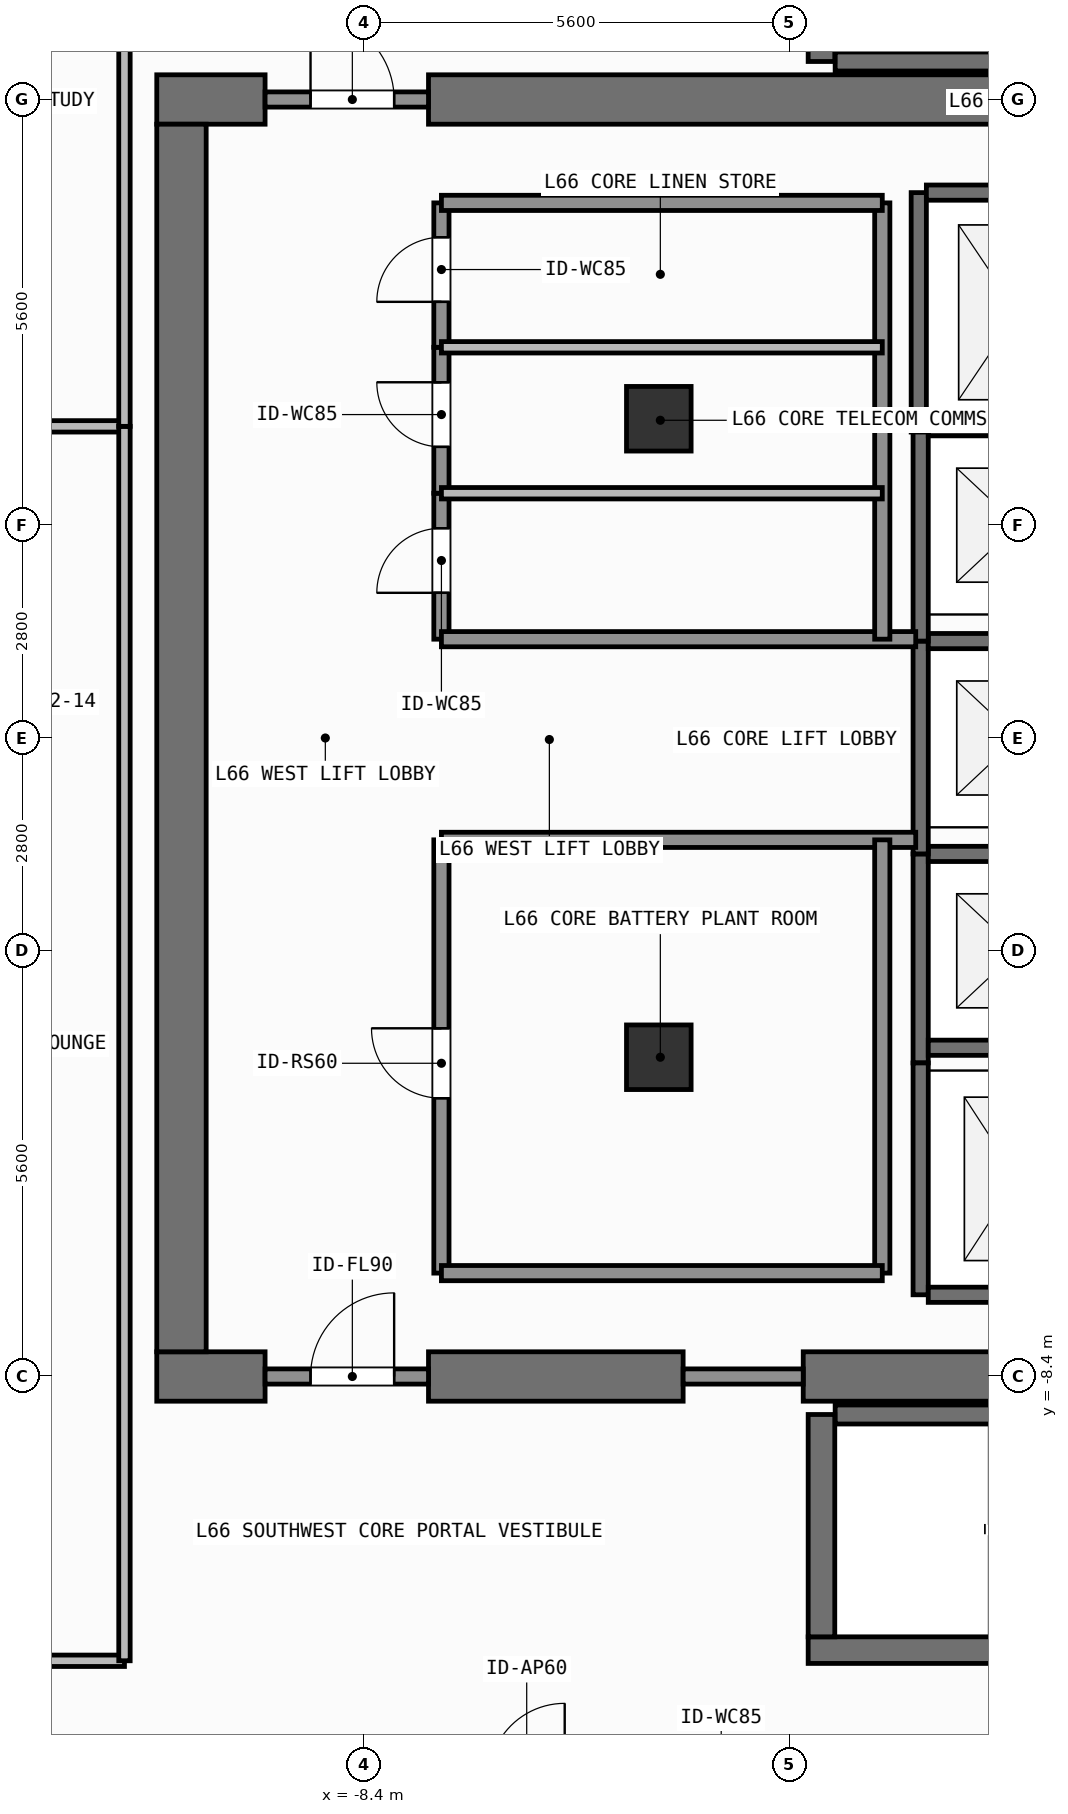
"""IFC4 building model, lengths in metres.
Left out: names, types, materials, properties, quantities, classifications, styles, units other than length and angle.
Written with IfcOpenShell. Run it as: python <this file> out.ifc"""

import sys

from ifc_helpers import new_model, si_unit, direction, frame, frame_2d, origin, origin_2d, place, context, subcontext, project, spatial, rectangle, extrude, element, fill, save


model = new_model("IFC4")
c1 = context("Model", 3, precision=1e-05, world=origin(), true_north=direction((0.0, 1.0)))
c2 = subcontext(c1, "Body", "Model", "MODEL_VIEW")
j1 = project(units=[si_unit("LENGTHUNIT", "METRE"), si_unit("PLANEANGLEUNIT", "RADIAN")], contexts=[c1])
p1 = place(None, origin())
s1 = spatial("IfcSite", under=j1, at=p1, CompositionType="ELEMENT")
p2 = place(p1, origin())
s2 = spatial("IfcBuilding", under=s1, at=p2, CompositionType="ELEMENT")
p3 = place(p2, frame((0.0, 0.0, 270.3)))
s3 = spatial("IfcBuildingStorey", under=s2, at=p3, CompositionType="ELEMENT", Elevation=270.3)
p4 = place(p3, frame((-11.125, -8.4, 0.0), z_axis=(0.0, 0.0, 1.0), x_axis=(1.0, 0.0, 0.0)))
e1 = element("IfcWall", 1, at=p4, inside=s3, PredefinedType="SHEAR", context=c2, shape_type="SweptSolid", body=[
    extrude(rectangle(XDim=1.425, YDim=0.65, at=frame_2d((0.712, 0.0))), origin(), (0.0, 0.0, 1.0), 3.9),
])
p5 = place(p3, frame((-7.55, -8.4, 0.0), z_axis=(0.0, 0.0, 1.0), x_axis=(1.0, 0.0, 0.0)))
e2 = element("IfcWall", 2, at=p5, inside=s3, PredefinedType="SHEAR", context=c2, shape_type="SweptSolid", body=[
    extrude(rectangle(XDim=3.35, YDim=0.65, at=frame_2d((1.675, 0.0))), origin(), (0.0, 0.0, 1.0), 3.9),
])
p6 = place(p3, frame((-2.62, -8.4, 0.0), z_axis=(0.0, 0.0, 1.0), x_axis=(1.0, 0.0, 0.0)))
e3 = element("IfcWall", 3, at=p6, inside=s3, PredefinedType="SHEAR", context=c2, shape_type="SweptSolid", body=[
    extrude(rectangle(XDim=7.27, YDim=0.65, at=frame_2d((3.635, 0.0))), origin(), (0.0, 0.0, 1.0), 3.9),
])
p7 = place(p3, frame((-11.125, 8.4, 0.0), z_axis=(0.0, 0.0, 1.0), x_axis=(1.0, 0.0, 0.0)))
e4 = element("IfcWall", 4, at=p7, inside=s3, PredefinedType="SHEAR", context=c2, shape_type="SweptSolid", body=[
    extrude(rectangle(XDim=1.425, YDim=0.65, at=frame_2d((0.712, 0.0))), origin(), (0.0, 0.0, 1.0), 3.9),
])
p8 = place(p3, frame((-7.55, 8.4, 0.0), z_axis=(0.0, 0.0, 1.0), x_axis=(1.0, 0.0, 0.0)))
e5 = element("IfcWall", 5, at=p8, inside=s3, PredefinedType="SHEAR", context=c2, shape_type="SweptSolid", body=[
    extrude(rectangle(XDim=16.275, YDim=0.65, at=frame_2d((8.138, 0.0))), origin(), (0.0, 0.0, 1.0), 3.9),
])
p9 = place(p3, frame((-10.8, -8.075, 0.0), z_axis=(0.0, 0.0, 1.0), x_axis=(0.0, 1.0, 0.0)))
e6 = element("IfcWall", 6, at=p9, inside=s3, PredefinedType="SHEAR", context=c2, shape_type="SweptSolid", body=[
    extrude(rectangle(XDim=16.15, YDim=0.65, at=frame_2d((8.075, 0.0))), origin(), (0.0, 0.0, 1.0), 3.9),
])
p10 = place(p3, frame((-2.555, -12.0, 0.0), z_axis=(0.0, 0.0, 1.0), x_axis=(1.0, 0.0, 0.0)))
e7 = element("IfcWall", 7, at=p10, inside=s3, PredefinedType="SHEAR", context=c2, shape_type="SweptSolid", body=[
    extrude(rectangle(XDim=7.31, YDim=0.35, at=frame_2d((3.655, 0.0))), origin(), (0.0, 0.0, 1.0), 3.9),
])
p11 = place(p3, frame((-2.2, -8.9, 0.0), z_axis=(0.0, 0.0, 1.0), x_axis=(1.0, 0.0, 0.0)))
e8 = element("IfcWall", 8, at=p11, inside=s3, PredefinedType="SHEAR", context=c2, shape_type="SweptSolid", body=[
    extrude(rectangle(XDim=6.6, YDim=0.25, at=frame_2d((3.3, 0.0))), origin(), (0.0, 0.0, 1.0), 3.9),
])
p12 = place(p3, frame((-2.38, -11.825, 0.0), z_axis=(0.0, 0.0, 1.0), x_axis=(0.0, 1.0, 0.0)))
e9 = element("IfcWall", 9, at=p12, inside=s3, PredefinedType="SHEAR", context=c2, shape_type="SweptSolid", body=[
    extrude(rectangle(XDim=2.925, YDim=0.35, at=frame_2d((1.462, 0.0))), origin(), (0.0, 0.0, 1.0), 3.9),
])
p13 = place(p3, frame((-2.2, 8.9, 0.0), z_axis=(0.0, 0.0, 1.0), x_axis=(1.0, 0.0, 0.0)))
e10 = element("IfcWall", 10, at=p13, inside=s3, PredefinedType="SHEAR", context=c2, shape_type="SweptSolid", body=[
    extrude(rectangle(XDim=6.6, YDim=0.25, at=frame_2d((3.3, 0.0))), origin(), (0.0, 0.0, 1.0), 3.9),
])
p14 = place(p3, frame((-2.38, 8.9, 0.0), z_axis=(0.0, 0.0, 1.0), x_axis=(0.0, 1.0, 0.0)))
e11 = element("IfcWall", 11, at=p14, inside=s3, PredefinedType="SHEAR", context=c2, shape_type="SweptSolid", body=[
    extrude(rectangle(XDim=2.925, YDim=0.35, at=frame_2d((1.462, 0.0))), origin(), (0.0, 0.0, 1.0), 3.9),
])
for number, where, z_axis, x_axis in (
    (12, (-4.52, -4.2, 0.0), (0.0, 0.0, 1.0), (1.0, 0.0, 0.0)),
    (13, (-4.52, 4.2, 0.0), (0.0, 0.0, 1.0), (1.0, 0.0, 0.0)),
):
    element("IfcColumn", number, at=place(p3, frame(where, z_axis=z_axis, x_axis=x_axis)), inside=s3, PredefinedType="COLUMN", context=c2, shape_type="SweptSolid", body=[
        extrude(rectangle(XDim=0.85, YDim=0.85, at=origin_2d()), origin(), (0.0, 0.0, 1.0), 3.9),
    ])
p15 = place(p3, frame((-1.075, -4.275, 0.0), z_axis=(0.0, 0.0, 1.0), x_axis=(0.0, 1.0, 0.0)))
e14 = element("IfcWall", 14, at=p15, inside=s3, PredefinedType="SHEAR", context=c2, shape_type="SweptSolid", body=[
    extrude(rectangle(XDim=2.75, YDim=0.2, at=frame_2d((1.375, 0.0))), origin(), (0.0, 0.0, 1.0), 3.68),
])
for number, where, z_axis, x_axis in (
    (15, (-0.975, -4.075, 0.0), (0.0, 0.0, 1.0), (1.0, 0.0, 0.0)),
    (16, (-0.975, -1.525, 0.0), (0.0, 0.0, 1.0), (1.0, 0.0, 0.0)),
):
    element("IfcWall", number, at=place(p3, frame(where, z_axis=z_axis, x_axis=x_axis)), inside=s3, PredefinedType="SHEAR", context=c2, shape_type="SweptSolid", body=[
        extrude(rectangle(XDim=2.35, YDim=0.2, at=frame_2d((1.175, 0.0))), origin(), (0.0, 0.0, 1.0), 3.68),
    ])
p16 = place(p3, frame((-1.075, -1.525, 0.0), z_axis=(0.0, 0.0, 1.0), x_axis=(0.0, 1.0, 0.0)))
e17 = element("IfcWall", 17, at=p16, inside=s3, PredefinedType="SHEAR", context=c2, shape_type="SweptSolid", body=[
    extrude(rectangle(XDim=2.8, YDim=0.2, at=frame_2d((1.4, 0.0))), origin(), (0.0, 0.0, 1.0), 3.68),
])
p17 = place(p3, frame((-0.975, 1.275, 0.0), z_axis=(0.0, 0.0, 1.0), x_axis=(1.0, 0.0, 0.0)))
e18 = element("IfcWall", 18, at=p17, inside=s3, PredefinedType="SHEAR", context=c2, shape_type="SweptSolid", body=[
    extrude(rectangle(XDim=2.35, YDim=0.2, at=frame_2d((1.175, 0.0))), origin(), (0.0, 0.0, 1.0), 3.68),
])
p18 = place(p3, frame((-1.075, 1.275, 0.0), z_axis=(0.0, 0.0, 1.0), x_axis=(0.0, 1.0, 0.0)))
e19 = element("IfcWall", 19, at=p18, inside=s3, PredefinedType="SHEAR", context=c2, shape_type="SweptSolid", body=[
    extrude(rectangle(XDim=2.8, YDim=0.2, at=frame_2d((1.4, 0.0))), origin(), (0.0, 0.0, 1.0), 3.68),
])
p19 = place(p3, frame((-0.975, 4.075, 0.0), z_axis=(0.0, 0.0, 1.0), x_axis=(1.0, 0.0, 0.0)))
e20 = element("IfcWall", 20, at=p19, inside=s3, PredefinedType="SHEAR", context=c2, shape_type="SweptSolid", body=[
    extrude(rectangle(XDim=2.35, YDim=0.2, at=frame_2d((1.175, 0.0))), origin(), (0.0, 0.0, 1.0), 3.68),
])
p20 = place(p3, frame((-1.1, 4.025, 0.0), z_axis=(0.0, 0.0, 1.0), x_axis=(0.0, 1.0, 0.0)))
e21 = element("IfcWall", 21, at=p20, inside=s3, PredefinedType="SHEAR", context=c2, shape_type="SweptSolid", body=[
    extrude(rectangle(XDim=3.15, YDim=0.2, at=frame_2d((1.575, 0.0))), origin(), (0.0, 0.0, 1.0), 3.68),
])
p21 = place(p3, frame((-1.0, 7.175, 0.0), z_axis=(0.0, 0.0, 1.0), x_axis=(1.0, 0.0, 0.0)))
e22 = element("IfcWall", 22, at=p21, inside=s3, PredefinedType="SHEAR", context=c2, shape_type="SweptSolid", body=[
    extrude(rectangle(XDim=2.4, YDim=0.2, at=frame_2d((1.2, 0.0))), origin(), (0.0, 0.0, 1.0), 3.68),
])
p22 = place(p3, frame((-1.075, -7.325, 0.0), z_axis=(0.0, 0.0, 1.0), x_axis=(0.0, 1.0, 0.0)))
e23 = element("IfcWall", 23, at=p22, inside=s3, PredefinedType="SHEAR", context=c2, shape_type="SweptSolid", body=[
    extrude(rectangle(XDim=3.05, YDim=0.2, at=frame_2d((1.525, 0.0))), origin(), (0.0, 0.0, 1.0), 3.68),
])
p23 = place(p3, frame((-0.975, -7.325, 0.0), z_axis=(0.0, 0.0, 1.0), x_axis=(1.0, 0.0, 0.0)))
e24 = element("IfcWall", 24, at=p23, inside=s3, PredefinedType="SHEAR", context=c2, shape_type="SweptSolid", body=[
    extrude(rectangle(XDim=2.35, YDim=0.2, at=frame_2d((1.175, 0.0))), origin(), (0.0, 0.0, 1.0), 3.68),
])
p24 = place(p3, frame((-9.7, -8.4, 0.0), z_axis=(0.0, 0.0, 1.0), x_axis=(1.0, 0.0, 0.0)))
e25 = element("IfcWall", 25, at=p24, inside=s3, PredefinedType="SOLIDWALL", context=c2, shape_type="SweptSolid", body=[
    extrude(rectangle(XDim=2.15, YDim=0.2, at=frame_2d((1.075, 0.0))), origin(), (0.0, 0.0, 1.0), 2.92),
])
p25 = place(p24, frame((0.598, 0.0, 0.0)))
e26 = element("IfcOpeningElement", 26, at=p25, cuts=e25, PredefinedType="OPENING", context=c2, shape_type="SweptSolid", body=[
    extrude(rectangle(XDim=1.1, YDim=2.15, at=frame_2d((0.55, 1.075))), frame((0.0, 0.11, 0.0), z_axis=(0.0, -1.0, 0.0), x_axis=(1.0, 0.0, 0.0)), (0.0, 0.0, 1.0), 0.22),
])
p26 = place(p3, frame((-9.7, 8.4, 0.0), z_axis=(0.0, 0.0, 1.0), x_axis=(1.0, 0.0, 0.0)))
e27 = element("IfcWall", 27, at=p26, inside=s3, PredefinedType="SOLIDWALL", context=c2, shape_type="SweptSolid", body=[
    extrude(rectangle(XDim=2.15, YDim=0.2, at=frame_2d((1.075, 0.0))), origin(), (0.0, 0.0, 1.0), 2.92),
])
p27 = place(p26, frame((0.598, 0.0, 0.0)))
e28 = element("IfcOpeningElement", 28, at=p27, cuts=e27, PredefinedType="OPENING", context=c2, shape_type="SweptSolid", body=[
    extrude(rectangle(XDim=1.1, YDim=2.15, at=frame_2d((0.55, 1.075))), frame((0.0, 0.11, 0.0), z_axis=(0.0, -1.0, 0.0), x_axis=(1.0, 0.0, 0.0)), (0.0, 0.0, 1.0), 0.22),
])
p28 = place(p3, frame((-7.38, -7.04, 0.0), z_axis=(0.0, 0.0, 1.0), x_axis=(0.0, 1.0, 0.0)))
e29 = element("IfcWall", 29, at=p28, inside=s3, PredefinedType="SOLIDWALL", context=c2, shape_type="SweptSolid", body=[
    extrude(rectangle(XDim=5.7, YDim=0.2, at=frame_2d((2.85, 0.0))), origin(), (0.0, 0.0, 1.0), 3.68),
])
p29 = place(p28, frame((2.301, 0.0, 0.0)))
e30 = element("IfcOpeningElement", 30, at=p29, cuts=e29, PredefinedType="OPENING", context=c2, shape_type="SweptSolid", body=[
    extrude(rectangle(XDim=0.92, YDim=2.1, at=frame_2d((0.46, 1.05))), frame((0.0, 0.11, 0.0), z_axis=(0.0, -1.0, 0.0), x_axis=(1.0, 0.0, 0.0)), (0.0, 0.0, 1.0), 0.22),
])
p30 = place(p3, frame((-7.38, 1.3, 0.0), z_axis=(0.0, 0.0, 1.0), x_axis=(0.0, 1.0, 0.0)))
e31 = element("IfcWall", 31, at=p30, inside=s3, PredefinedType="SOLIDWALL", context=c2, shape_type="SweptSolid", body=[
    extrude(rectangle(XDim=1.92, YDim=0.2, at=frame_2d((0.96, 0.0))), origin(), (0.0, 0.0, 1.0), 3.68),
])
p31 = place(p30, frame((0.61, 0.0, 0.0)))
e32 = element("IfcOpeningElement", 32, at=p31, cuts=e31, PredefinedType="OPENING", context=c2, shape_type="SweptSolid", body=[
    extrude(rectangle(XDim=0.85, YDim=2.1, at=frame_2d((0.425, 1.05))), frame((0.0, 0.11, 0.0), z_axis=(0.0, -1.0, 0.0), x_axis=(1.0, 0.0, 0.0)), (0.0, 0.0, 1.0), 0.22),
])
p32 = place(p3, frame((-7.38, 3.22, 0.0), z_axis=(0.0, 0.0, 1.0), x_axis=(0.0, 1.0, 0.0)))
e33 = element("IfcWall", 33, at=p32, inside=s3, PredefinedType="SOLIDWALL", context=c2, shape_type="SweptSolid", body=[
    extrude(rectangle(XDim=1.92, YDim=0.2, at=frame_2d((0.96, 0.0))), origin(), (0.0, 0.0, 1.0), 3.68),
])
p33 = place(p32, frame((0.61, 0.0, 0.0)))
e34 = element("IfcOpeningElement", 34, at=p33, cuts=e33, PredefinedType="OPENING", context=c2, shape_type="SweptSolid", body=[
    extrude(rectangle(XDim=0.85, YDim=2.1, at=frame_2d((0.425, 1.05))), frame((0.0, 0.11, 0.0), z_axis=(0.0, -1.0, 0.0), x_axis=(1.0, 0.0, 0.0)), (0.0, 0.0, 1.0), 0.22),
])
p34 = place(p3, frame((-7.38, 5.14, 0.0), z_axis=(0.0, 0.0, 1.0), x_axis=(0.0, 1.0, 0.0)))
e35 = element("IfcWall", 35, at=p34, inside=s3, PredefinedType="SOLIDWALL", context=c2, shape_type="SweptSolid", body=[
    extrude(rectangle(XDim=1.9, YDim=0.2, at=frame_2d((0.95, 0.0))), origin(), (0.0, 0.0, 1.0), 3.68),
])
p35 = place(p34, frame((0.598, 0.0, 0.0)))
e36 = element("IfcOpeningElement", 36, at=p35, cuts=e35, PredefinedType="OPENING", context=c2, shape_type="SweptSolid", body=[
    extrude(rectangle(XDim=0.85, YDim=2.1, at=frame_2d((0.425, 1.05))), frame((0.0, 0.11, 0.0), z_axis=(0.0, -1.0, 0.0), x_axis=(1.0, 0.0, 0.0)), (0.0, 0.0, 1.0), 0.22),
])
p36 = place(p3, frame((-16.93, -12.14, 0.0), z_axis=(0.0, 0.0, 1.0), x_axis=(1.0, 0.0, 0.0)))
e37 = element("IfcWall", 37, at=p36, inside=s3, PredefinedType="PARTITIONING", context=c2, shape_type="SweptSolid", body=[
    extrude(rectangle(XDim=5.38, YDim=0.15, at=frame_2d((2.69, 0.0))), origin(), (0.0, 0.0, 1.0), 3.68),
])
p37 = place(p36, frame((2.24, 0.0, 0.0)))
e38 = element("IfcOpeningElement", 38, at=p37, cuts=e37, PredefinedType="OPENING", context=c2, shape_type="SweptSolid", body=[
    extrude(rectangle(XDim=0.9, YDim=2.1, at=frame_2d((0.45, 1.05))), frame((0.0, 0.085, 0.0), z_axis=(0.0, -1.0, 0.0), x_axis=(1.0, 0.0, 0.0)), (0.0, 0.0, 1.0), 0.17),
])
p38 = place(p3, frame((-4.2, -8.4, 0.0), z_axis=(0.0, 0.0, 1.0), x_axis=(1.0, 0.0, 0.0)))
e39 = element("IfcWall", 39, at=p38, inside=s3, PredefinedType="SOLIDWALL", context=c2, shape_type="SweptSolid", body=[
    extrude(rectangle(XDim=1.58, YDim=0.2, at=frame_2d((0.79, 0.0))), origin(), (0.0, 0.0, 1.0), 2.92),
])
for number, where, z_axis, x_axis in (
    (40, (-7.38, -1.34, 0.0), (0.0, 0.0, 1.0), (1.0, 0.0, 0.0)),
    (41, (-7.38, 1.3, 0.0), (0.0, 0.0, 1.0), (1.0, 0.0, 0.0)),
):
    element("IfcWall", number, at=place(p3, frame(where, z_axis=z_axis, x_axis=x_axis)), inside=s3, PredefinedType="SOLIDWALL", context=c2, shape_type="SweptSolid", body=[
        extrude(rectangle(XDim=6.24, YDim=0.2, at=frame_2d((3.12, 0.0))), origin(), (0.0, 0.0, 1.0), 3.68),
    ])
p39 = place(p3, frame((-1.58, -7.04, 0.0), z_axis=(0.0, 0.0, 1.0), x_axis=(0.0, 1.0, 0.0)))
e42 = element("IfcWall", 42, at=p39, inside=s3, PredefinedType="SOLIDWALL", context=c2, shape_type="SweptSolid", body=[
    extrude(rectangle(XDim=5.7, YDim=0.2, at=frame_2d((2.85, 0.0))), origin(), (0.0, 0.0, 1.0), 3.68),
])
p40 = place(p3, frame((-7.38, -7.04, 0.0), z_axis=(0.0, 0.0, 1.0), x_axis=(1.0, 0.0, 0.0)))
e43 = element("IfcWall", 43, at=p40, inside=s3, PredefinedType="SOLIDWALL", context=c2, shape_type="SweptSolid", body=[
    extrude(rectangle(XDim=5.8, YDim=0.2, at=frame_2d((2.9, 0.0))), origin(), (0.0, 0.0, 1.0), 3.68),
])
p41 = place(p3, frame((-1.58, 1.3, 0.0), z_axis=(0.0, 0.0, 1.0), x_axis=(0.0, 1.0, 0.0)))
e44 = element("IfcWall", 44, at=p41, inside=s3, PredefinedType="SOLIDWALL", context=c2, shape_type="SweptSolid", body=[
    extrude(rectangle(XDim=5.74, YDim=0.2, at=frame_2d((2.87, 0.0))), origin(), (0.0, 0.0, 1.0), 3.68),
])
p42 = place(p3, frame((-7.38, 7.04, 0.0), z_axis=(0.0, 0.0, 1.0), x_axis=(1.0, 0.0, 0.0)))
e45 = element("IfcWall", 45, at=p42, inside=s3, PredefinedType="SOLIDWALL", context=c2, shape_type="SweptSolid", body=[
    extrude(rectangle(XDim=5.8, YDim=0.2, at=frame_2d((2.9, 0.0))), origin(), (0.0, 0.0, 1.0), 3.68),
])
for number, where, z_axis, x_axis in (
    (46, (-7.38, 3.22, 0.0), (0.0, 0.0, 1.0), (1.0, 0.0, 0.0)),
    (47, (-7.38, 5.14, 0.0), (0.0, 0.0, 1.0), (1.0, 0.0, 0.0)),
):
    element("IfcWall", number, at=place(p3, frame(where, z_axis=z_axis, x_axis=x_axis)), inside=s3, PredefinedType="PARTITIONING", context=c2, shape_type="SweptSolid", body=[
        extrude(rectangle(XDim=5.8, YDim=0.15, at=frame_2d((2.9, 0.0))), origin(), (0.0, 0.0, 1.0), 3.68),
    ])
p43 = place(p3, frame((-16.93, 4.1, 0.0), z_axis=(0.0, 0.0, 1.0), x_axis=(1.0, 0.0, 0.0)))
e48 = element("IfcWall", 48, at=p43, inside=s3, PredefinedType="PARTITIONING", context=c2, shape_type="SweptSolid", body=[
    extrude(rectangle(XDim=5.38, YDim=0.15, at=frame_2d((2.69, 0.0))), origin(), (0.0, 0.0, 1.0), 3.68),
])
p44 = place(p3, frame((-11.55, -12.14, 0.0), z_axis=(0.0, 0.0, 1.0), x_axis=(0.0, 1.0, 0.0)))
e49 = element("IfcWall", 49, at=p44, inside=s3, PredefinedType="PARTITIONING", context=c2, shape_type="SweptSolid", body=[
    extrude(rectangle(XDim=16.24, YDim=0.15, at=frame_2d((8.12, 0.0))), origin(), (0.0, 0.0, 1.0), 3.68),
])
p45 = place(p3, frame((-11.55, 4.1, 0.0), z_axis=(0.0, 0.0, 1.0), x_axis=(0.0, 1.0, 0.0)))
e50 = element("IfcWall", 50, at=p45, inside=s3, PredefinedType="PARTITIONING", context=c2, shape_type="SweptSolid", body=[
    extrude(rectangle(XDim=8.04, YDim=0.15, at=frame_2d((4.02, 0.0))), origin(), (0.0, 0.0, 1.0), 3.68),
])
p46 = place(p25, origin())
e51 = element("IfcDoor", 51, at=p46, inside=s3, OperationType="SINGLE_SWING_RIGHT", PredefinedType="DOOR", context=c2, shape_type="SweptSolid", body=[
    extrude(rectangle(XDim=1.1, YDim=2.15, at=frame_2d((0.55, 1.075))), frame((0.0, 0.025, 0.0), z_axis=(0.0, -1.0, 0.0), x_axis=(1.0, 0.0, 0.0)), (0.0, 0.0, 1.0), 0.05),
])
fill(e26, e51)
p47 = place(p27, origin())
e52 = element("IfcDoor", 52, at=p47, inside=s3, OperationType="SINGLE_SWING_LEFT", PredefinedType="DOOR", context=c2, shape_type="SweptSolid", body=[
    extrude(rectangle(XDim=1.1, YDim=2.15, at=frame_2d((0.55, 1.075))), frame((0.0, 0.025, 0.0), z_axis=(0.0, -1.0, 0.0), x_axis=(1.0, 0.0, 0.0)), (0.0, 0.0, 1.0), 0.05),
])
fill(e28, e52)
p48 = place(p29, origin())
e53 = element("IfcDoor", 53, at=p48, inside=s3, OperationType="SINGLE_SWING_RIGHT", PredefinedType="DOOR", context=c2, shape_type="SweptSolid", body=[
    extrude(rectangle(XDim=0.92, YDim=2.1, at=frame_2d((0.46, 1.05))), frame((0.0, 0.025, 0.0), z_axis=(0.0, -1.0, 0.0), x_axis=(1.0, 0.0, 0.0)), (0.0, 0.0, 1.0), 0.05),
])
fill(e30, e53)
p49 = place(p31, origin())
e54 = element("IfcDoor", 54, at=p49, inside=s3, OperationType="SINGLE_SWING_LEFT", PredefinedType="DOOR", context=c2, shape_type="SweptSolid", body=[
    extrude(rectangle(XDim=0.85, YDim=2.1, at=frame_2d((0.425, 1.05))), frame((0.0, 0.025, 0.0), z_axis=(0.0, -1.0, 0.0), x_axis=(1.0, 0.0, 0.0)), (0.0, 0.0, 1.0), 0.05),
])
fill(e32, e54)
p50 = place(p33, origin())
e55 = element("IfcDoor", 55, at=p50, inside=s3, OperationType="SINGLE_SWING_RIGHT", PredefinedType="DOOR", context=c2, shape_type="SweptSolid", body=[
    extrude(rectangle(XDim=0.85, YDim=2.1, at=frame_2d((0.425, 1.05))), frame((0.0, 0.025, 0.0), z_axis=(0.0, -1.0, 0.0), x_axis=(1.0, 0.0, 0.0)), (0.0, 0.0, 1.0), 0.05),
])
fill(e34, e55)
p51 = place(p35, origin())
e56 = element("IfcDoor", 56, at=p51, inside=s3, OperationType="SINGLE_SWING_LEFT", PredefinedType="DOOR", context=c2, shape_type="SweptSolid", body=[
    extrude(rectangle(XDim=0.85, YDim=2.1, at=frame_2d((0.425, 1.05))), frame((0.0, 0.025, 0.0), z_axis=(0.0, -1.0, 0.0), x_axis=(1.0, 0.0, 0.0)), (0.0, 0.0, 1.0), 0.05),
])
fill(e36, e56)
save(model, sys.argv[1])
